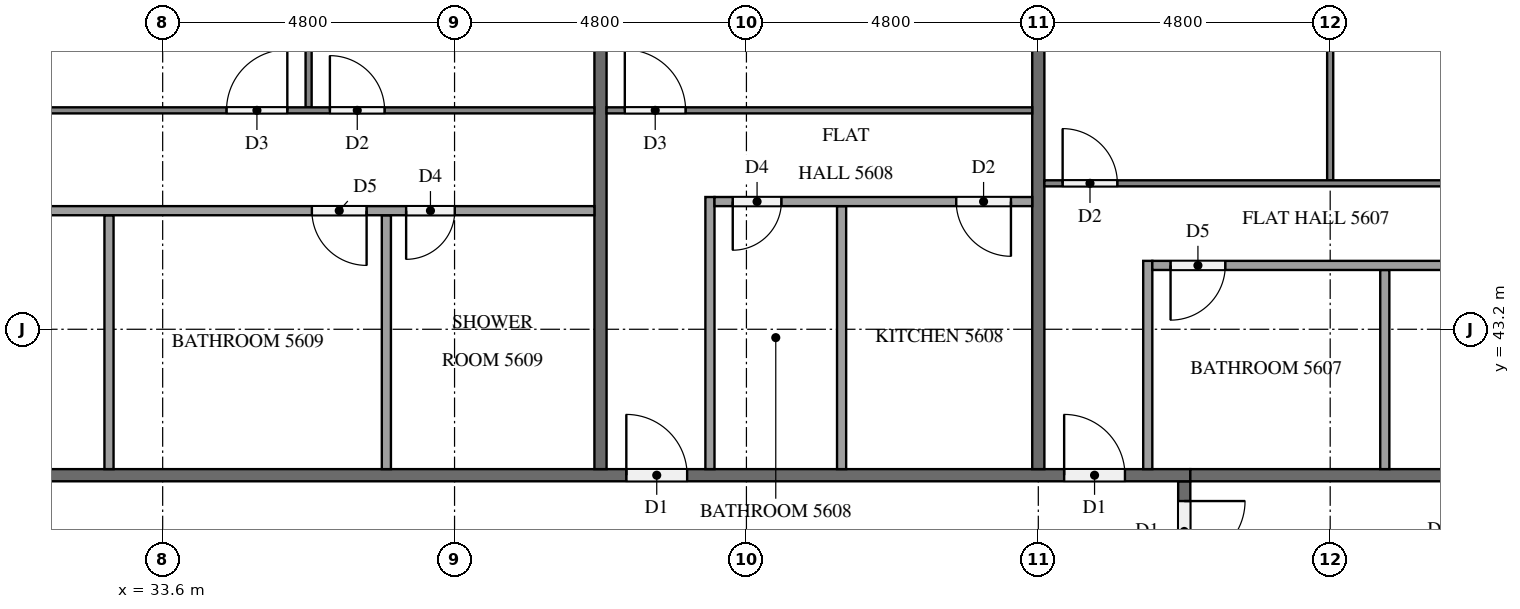
"""IFC4 building model, lengths in metres.
Left out: names, types, materials, properties, quantities, classifications, styles, units other than length and angle.
Written with IfcOpenShell. Run it as: python <this file> out.ifc"""

import sys

from ifc_helpers import new_model, si_unit, direction, frame, frame_2d, origin, place, context, subcontext, project, spatial, rectangle, extrude, element, fill, save


model = new_model("IFC4")
c1 = context("Model", 3, precision=1e-05, world=origin(), true_north=direction((0.0, 1.0)))
c2 = subcontext(c1, "Body", "Model", "MODEL_VIEW")
j1 = project(units=[si_unit("LENGTHUNIT", "METRE"), si_unit("PLANEANGLEUNIT", "RADIAN")], contexts=[c1])
p1 = place(None, origin())
s1 = spatial("IfcSite", under=j1, at=p1, CompositionType="ELEMENT")
p2 = place(p1, origin())
s2 = spatial("IfcBuilding", under=s1, at=p2, CompositionType="ELEMENT")
p3 = place(p2, frame((0.0, 0.0, 215.8)))
s3 = spatial("IfcBuildingStorey", under=s2, at=p3, CompositionType="ELEMENT", Elevation=215.8)
p4 = place(p3, frame((50.4, 40.7, 0.0), z_axis=(0.0, 0.0, 1.0), x_axis=(0.0, -1.0, 0.0)))
e1 = element("IfcWall", 1, at=p4, inside=s3, PredefinedType="PARTITIONING", context=c2, shape_type="SweptSolid", body=[
    extrude(rectangle(XDim=28.6, YDim=0.2, at=frame_2d((14.3, 0.0))), origin(), (0.0, 0.0, 1.0), 3.2),
])
p5 = place(p4, frame((19.525, 0.0, 0.0)))
e2 = element("IfcOpeningElement", 2, at=p5, cuts=e1, PredefinedType="OPENING", context=c2, shape_type="SweptSolid", body=[
    extrude(rectangle(XDim=1.0, YDim=2.1, at=frame_2d((0.5, 1.05))), frame((0.0, 0.11, 0.0), z_axis=(0.0, -1.0, 0.0), x_axis=(1.0, 0.0, 0.0)), (0.0, 0.0, 1.0), 0.22),
])
p6 = place(p4, frame((7.525, 0.0, 0.0)))
e3 = element("IfcOpeningElement", 3, at=p6, cuts=e1, PredefinedType="OPENING", context=c2, shape_type="SweptSolid", body=[
    extrude(rectangle(XDim=1.0, YDim=2.1, at=frame_2d((0.5, 1.05))), frame((0.0, 0.11, 0.0), z_axis=(0.0, -1.0, 0.0), x_axis=(1.0, 0.0, 0.0)), (0.0, 0.0, 1.0), 0.22),
])
p7 = place(p4, frame((0.325, 0.0, 0.0)))
e4 = element("IfcOpeningElement", 4, at=p7, cuts=e1, PredefinedType="OPENING", context=c2, shape_type="SweptSolid", body=[
    extrude(rectangle(XDim=1.0, YDim=2.1, at=frame_2d((0.5, 1.05))), frame((0.0, 0.11, 0.0), z_axis=(0.0, -1.0, 0.0), x_axis=(1.0, 0.0, 0.0)), (0.0, 0.0, 1.0), 0.22),
])
p8 = place(p3, frame((11.9, 40.8, 0.0), z_axis=(0.0, 0.0, 1.0), x_axis=(1.0, 0.0, 0.0)))
e5 = element("IfcWall", 5, at=p8, inside=s3, PredefinedType="PARTITIONING", context=c2, shape_type="SweptSolid", body=[
    extrude(rectangle(XDim=38.6, YDim=0.2, at=frame_2d((19.3, 0.0))), origin(), (0.0, 0.0, 1.0), 3.2),
])
p9 = place(p8, frame((36.525, 0.0, 0.0)))
e6 = element("IfcOpeningElement", 6, at=p9, cuts=e5, PredefinedType="OPENING", context=c2, shape_type="SweptSolid", body=[
    extrude(rectangle(XDim=1.0, YDim=2.1, at=frame_2d((0.5, 1.05))), frame((0.0, 0.11, 0.0), z_axis=(0.0, -1.0, 0.0), x_axis=(1.0, 0.0, 0.0)), (0.0, 0.0, 1.0), 0.22),
])
p10 = place(p8, frame((29.325, 0.0, 0.0)))
e7 = element("IfcOpeningElement", 7, at=p10, cuts=e5, PredefinedType="OPENING", context=c2, shape_type="SweptSolid", body=[
    extrude(rectangle(XDim=1.0, YDim=2.1, at=frame_2d((0.5, 1.05))), frame((0.0, 0.11, 0.0), z_axis=(0.0, -1.0, 0.0), x_axis=(1.0, 0.0, 0.0)), (0.0, 0.0, 1.0), 0.22),
])
p11 = place(p8, frame((12.525, 0.0, 0.0)))
e8 = element("IfcOpeningElement", 8, at=p11, cuts=e5, PredefinedType="OPENING", context=c2, shape_type="SweptSolid", body=[
    extrude(rectangle(XDim=1.0, YDim=2.1, at=frame_2d((0.5, 1.05))), frame((0.0, 0.11, 0.0), z_axis=(0.0, -1.0, 0.0), x_axis=(1.0, 0.0, 0.0)), (0.0, 0.0, 1.0), 0.22),
])
p12 = place(p8, frame((10.625, 0.0, 0.0)))
e9 = element("IfcOpeningElement", 9, at=p12, cuts=e5, PredefinedType="OPENING", context=c2, shape_type="SweptSolid", body=[
    extrude(rectangle(XDim=1.1, YDim=2.1, at=frame_2d((0.55, 1.05))), frame((0.0, 0.11, 0.0), z_axis=(0.0, -1.0, 0.0), x_axis=(1.0, 0.0, 0.0)), (0.0, 0.0, 1.0), 0.22),
])
p13 = place(p3, frame((50.5, 40.8, 0.0), z_axis=(0.0, 0.0, 1.0), x_axis=(1.0, 0.0, 0.0)))
e10 = element("IfcWall", 10, at=p13, inside=s3, PredefinedType="PARTITIONING", context=c2, shape_type="SweptSolid", body=[
    extrude(rectangle(XDim=11.8, YDim=0.2, at=frame_2d((5.9, 0.0))), origin(), (0.0, 0.0, 1.0), 3.2),
])
p14 = place(p3, frame((48.0, 52.475, 0.0), z_axis=(0.0, 0.0, 1.0), x_axis=(0.0, -1.0, 0.0)))
e11 = element("IfcWall", 11, at=p14, inside=s3, PredefinedType="PARTITIONING", context=c2, shape_type="SweptSolid", body=[
    extrude(rectangle(XDim=11.575, YDim=0.2, at=frame_2d((5.788, 0.0))), origin(), (0.0, 0.0, 1.0), 3.2),
])
p15 = place(p3, frame((40.8, 52.7, 0.0), z_axis=(0.0, 0.0, 1.0), x_axis=(0.0, -1.0, 0.0)))
e12 = element("IfcWall", 12, at=p15, inside=s3, PredefinedType="PARTITIONING", context=c2, shape_type="SweptSolid", body=[
    extrude(rectangle(XDim=11.8, YDim=0.2, at=frame_2d((5.9, 0.0))), origin(), (0.0, 0.0, 1.0), 3.2),
])
p16 = place(p3, frame((52.8, 45.65, 0.0), z_axis=(0.0, 0.0, 1.0), x_axis=(0.0, 1.0, 0.0)))
e13 = element("IfcWall", 13, at=p16, inside=s3, PredefinedType="PARTITIONING", context=c2, shape_type="SweptSolid", body=[
    extrude(rectangle(XDim=7.05, YDim=0.1, at=frame_2d((3.525, 0.0))), origin(), (0.0, 0.0, 1.0), 3.2),
])
p17 = place(p3, frame((48.1, 45.6, 0.0), z_axis=(0.0, 0.0, 1.0), x_axis=(1.0, 0.0, 0.0)))
e14 = element("IfcWall", 14, at=p17, inside=s3, PredefinedType="PARTITIONING", context=c2, shape_type="SweptSolid", body=[
    extrude(rectangle(XDim=14.2, YDim=0.1, at=frame_2d((7.1, 0.0))), origin(), (0.0, 0.0, 1.0), 3.2),
])
p18 = place(p17, frame((0.3, 0.0, 0.0)))
e15 = element("IfcOpeningElement", 15, at=p18, cuts=e14, PredefinedType="OPENING", context=c2, shape_type="SweptSolid", body=[
    extrude(rectangle(XDim=0.9, YDim=2.1, at=frame_2d((0.45, 1.05))), frame((0.0, 0.06, 0.0), z_axis=(0.0, -1.0, 0.0), x_axis=(1.0, 0.0, 0.0)), (0.0, 0.0, 1.0), 0.12),
])
p19 = place(p17, frame((8.25, 0.0, 0.0)))
e16 = element("IfcOpeningElement", 16, at=p19, cuts=e14, PredefinedType="OPENING", context=c2, shape_type="SweptSolid", body=[
    extrude(rectangle(XDim=0.9, YDim=2.1, at=frame_2d((0.45, 1.05))), frame((0.0, 0.06, 0.0), z_axis=(0.0, -1.0, 0.0), x_axis=(1.0, 0.0, 0.0)), (0.0, 0.0, 1.0), 0.12),
])
p20 = place(p17, frame((9.85, 0.0, 0.0)))
e17 = element("IfcOpeningElement", 17, at=p20, cuts=e14, PredefinedType="OPENING", context=c2, shape_type="SweptSolid", body=[
    extrude(rectangle(XDim=1.0, YDim=2.1, at=frame_2d((0.5, 1.05))), frame((0.0, 0.06, 0.0), z_axis=(0.0, -1.0, 0.0), x_axis=(1.0, 0.0, 0.0)), (0.0, 0.0, 1.0), 0.12),
])
p21 = place(p3, frame((53.698, 40.9, 0.0), z_axis=(0.0, 0.0, 1.0), x_axis=(0.0, 1.0, 0.0)))
e18 = element("IfcWall", 18, at=p21, inside=s3, PredefinedType="PARTITIONING", context=c2, shape_type="SweptSolid", body=[
    extrude(rectangle(XDim=3.275, YDim=0.15, at=frame_2d((1.638, 0.0))), origin(), (0.0, 0.0, 1.0), 3.2),
])
p22 = place(p3, frame((49.8, 40.9, 0.0), z_axis=(0.0, 0.0, 1.0), x_axis=(0.0, 1.0, 0.0)))
e19 = element("IfcWall", 19, at=p22, inside=s3, PredefinedType="PARTITIONING", context=c2, shape_type="SweptSolid", body=[
    extrude(rectangle(XDim=3.425, YDim=0.15, at=frame_2d((1.712, 0.0))), origin(), (0.0, 0.0, 1.0), 3.2),
])
p23 = place(p3, frame((62.3, 44.25, 0.0), z_axis=(0.0, 0.0, 1.0), x_axis=(-1.0, 0.0, 0.0)))
e20 = element("IfcWall", 20, at=p23, inside=s3, PredefinedType="PARTITIONING", context=c2, shape_type="SweptSolid", body=[
    extrude(rectangle(XDim=12.425, YDim=0.15, at=frame_2d((6.212, 0.0))), origin(), (0.0, 0.0, 1.0), 3.2),
])
p24 = place(p23, frame((11.225, 0.0, 0.0)))
e21 = element("IfcOpeningElement", 21, at=p24, cuts=e20, PredefinedType="OPENING", context=c2, shape_type="SweptSolid", body=[
    extrude(rectangle(XDim=0.9, YDim=2.1, at=frame_2d((0.45, 1.05))), frame((0.0, 0.085, 0.0), z_axis=(0.0, -1.0, 0.0), x_axis=(1.0, 0.0, 0.0)), (0.0, 0.0, 1.0), 0.17),
])
p25 = place(p23, frame((3.192, 0.0, 0.0)))
e22 = element("IfcOpeningElement", 22, at=p25, cuts=e20, PredefinedType="OPENING", context=c2, shape_type="SweptSolid", body=[
    extrude(rectangle(XDim=0.9, YDim=2.1, at=frame_2d((0.45, 1.05))), frame((0.0, 0.085, 0.0), z_axis=(0.0, -1.0, 0.0), x_axis=(1.0, 0.0, 0.0)), (0.0, 0.0, 1.0), 0.17),
])
p26 = place(p23, frame((1.742, 0.0, 0.0)))
e23 = element("IfcOpeningElement", 23, at=p26, cuts=e20, PredefinedType="OPENING", context=c2, shape_type="SweptSolid", body=[
    extrude(rectangle(XDim=0.8, YDim=2.1, at=frame_2d((0.4, 1.05))), frame((0.0, 0.085, 0.0), z_axis=(0.0, -1.0, 0.0), x_axis=(1.0, 0.0, 0.0)), (0.0, 0.0, 1.0), 0.17),
])
p27 = place(p3, frame((40.9, 46.8, 0.0), z_axis=(0.0, 0.0, 1.0), x_axis=(1.0, 0.0, 0.0)))
e24 = element("IfcWall", 24, at=p27, inside=s3, PredefinedType="PARTITIONING", context=c2, shape_type="SweptSolid", body=[
    extrude(rectangle(XDim=7.0, YDim=0.1, at=frame_2d((3.5, 0.0))), origin(), (0.0, 0.0, 1.0), 3.2),
])
p28 = place(p27, frame((0.3, 0.0, 0.0)))
e25 = element("IfcOpeningElement", 25, at=p28, cuts=e24, PredefinedType="OPENING", context=c2, shape_type="SweptSolid", body=[
    extrude(rectangle(XDim=1.0, YDim=2.1, at=frame_2d((0.5, 1.05))), frame((0.0, 0.06, 0.0), z_axis=(0.0, -1.0, 0.0), x_axis=(1.0, 0.0, 0.0)), (0.0, 0.0, 1.0), 0.12),
])
p29 = place(p3, frame((44.765, 40.9, 0.0), z_axis=(0.0, 0.0, 1.0), x_axis=(0.0, 1.0, 0.0)))
e26 = element("IfcWall", 26, at=p29, inside=s3, PredefinedType="PARTITIONING", context=c2, shape_type="SweptSolid", body=[
    extrude(rectangle(XDim=4.325, YDim=0.15, at=frame_2d((2.163, 0.0))), origin(), (0.0, 0.0, 1.0), 3.2),
])
p30 = place(p3, frame((42.6, 40.9, 0.0), z_axis=(0.0, 0.0, 1.0), x_axis=(0.0, 1.0, 0.0)))
e27 = element("IfcWall", 27, at=p30, inside=s3, PredefinedType="PARTITIONING", context=c2, shape_type="SweptSolid", body=[
    extrude(rectangle(XDim=4.475, YDim=0.15, at=frame_2d((2.238, 0.0))), origin(), (0.0, 0.0, 1.0), 3.2),
])
p31 = place(p3, frame((47.9, 45.3, 0.0), z_axis=(0.0, 0.0, 1.0), x_axis=(-1.0, 0.0, 0.0)))
e28 = element("IfcWall", 28, at=p31, inside=s3, PredefinedType="PARTITIONING", context=c2, shape_type="SweptSolid", body=[
    extrude(rectangle(XDim=5.225, YDim=0.15, at=frame_2d((2.612, 0.0))), origin(), (0.0, 0.0, 1.0), 3.2),
])
p32 = place(p31, frame((4.125, 0.0, 0.0)))
e29 = element("IfcOpeningElement", 29, at=p32, cuts=e28, PredefinedType="OPENING", context=c2, shape_type="SweptSolid", body=[
    extrude(rectangle(XDim=0.8, YDim=2.1, at=frame_2d((0.4, 1.05))), frame((0.0, 0.085, 0.0), z_axis=(0.0, -1.0, 0.0), x_axis=(1.0, 0.0, 0.0)), (0.0, 0.0, 1.0), 0.17),
])
p33 = place(p31, frame((0.35, 0.0, 0.0)))
e30 = element("IfcOpeningElement", 30, at=p33, cuts=e28, PredefinedType="OPENING", context=c2, shape_type="SweptSolid", body=[
    extrude(rectangle(XDim=0.9, YDim=2.1, at=frame_2d((0.45, 1.05))), frame((0.0, 0.085, 0.0), z_axis=(0.0, -1.0, 0.0), x_axis=(1.0, 0.0, 0.0)), (0.0, 0.0, 1.0), 0.17),
])
p34 = place(p3, frame((36.0, 46.85, 0.0), z_axis=(0.0, 0.0, 1.0), x_axis=(0.0, 1.0, 0.0)))
e31 = element("IfcWall", 31, at=p34, inside=s3, PredefinedType="PARTITIONING", context=c2, shape_type="SweptSolid", body=[
    extrude(rectangle(XDim=5.85, YDim=0.1, at=frame_2d((2.925, 0.0))), origin(), (0.0, 0.0, 1.0), 3.2),
])
p35 = place(p3, frame((24.1, 46.8, 0.0), z_axis=(0.0, 0.0, 1.0), x_axis=(1.0, 0.0, 0.0)))
e32 = element("IfcWall", 32, at=p35, inside=s3, PredefinedType="PARTITIONING", context=c2, shape_type="SweptSolid", body=[
    extrude(rectangle(XDim=16.6, YDim=0.1, at=frame_2d((8.3, 0.0))), origin(), (0.0, 0.0, 1.0), 3.2),
])
p36 = place(p35, frame((0.3, 0.0, 0.0)))
e33 = element("IfcOpeningElement", 33, at=p36, cuts=e32, PredefinedType="OPENING", context=c2, shape_type="SweptSolid", body=[
    extrude(rectangle(XDim=0.9, YDim=2.1, at=frame_2d((0.45, 1.05))), frame((0.0, 0.06, 0.0), z_axis=(0.0, -1.0, 0.0), x_axis=(1.0, 0.0, 0.0)), (0.0, 0.0, 1.0), 0.12),
])
p37 = place(p35, frame((10.55, 0.0, 0.0)))
e34 = element("IfcOpeningElement", 34, at=p37, cuts=e32, PredefinedType="OPENING", context=c2, shape_type="SweptSolid", body=[
    extrude(rectangle(XDim=1.0, YDim=2.1, at=frame_2d((0.5, 1.05))), frame((0.0, 0.06, 0.0), z_axis=(0.0, -1.0, 0.0), x_axis=(1.0, 0.0, 0.0)), (0.0, 0.0, 1.0), 0.12),
])
p38 = place(p35, frame((12.25, 0.0, 0.0)))
e35 = element("IfcOpeningElement", 35, at=p38, cuts=e32, PredefinedType="OPENING", context=c2, shape_type="SweptSolid", body=[
    extrude(rectangle(XDim=0.9, YDim=2.1, at=frame_2d((0.45, 1.05))), frame((0.0, 0.06, 0.0), z_axis=(0.0, -1.0, 0.0), x_axis=(1.0, 0.0, 0.0)), (0.0, 0.0, 1.0), 0.12),
])
for number, where, z_axis, x_axis in (
    (36, (32.717, 40.9, 0.0), (0.0, 0.0, 1.0), (0.0, 1.0, 0.0)),
    (37, (37.279, 40.9, 0.0), (0.0, 0.0, 1.0), (0.0, 1.0, 0.0)),
):
    element("IfcWall", number, at=place(p3, frame(where, z_axis=z_axis, x_axis=x_axis)), inside=s3, PredefinedType="PARTITIONING", context=c2, shape_type="SweptSolid", body=[
        extrude(rectangle(XDim=4.175, YDim=0.15, at=frame_2d((2.087, 0.0))), origin(), (0.0, 0.0, 1.0), 3.2),
    ])
p39 = place(p3, frame((40.7, 45.15, 0.0), z_axis=(0.0, 0.0, 1.0), x_axis=(-1.0, 0.0, 0.0)))
e38 = element("IfcWall", 38, at=p39, inside=s3, PredefinedType="PARTITIONING", context=c2, shape_type="SweptSolid", body=[
    extrude(rectangle(XDim=14.825, YDim=0.15, at=frame_2d((7.413, 0.0))), origin(), (0.0, 0.0, 1.0), 3.2),
])
p40 = place(p39, frame((13.625, 0.0, 0.0)))
e39 = element("IfcOpeningElement", 39, at=p40, cuts=e38, PredefinedType="OPENING", context=c2, shape_type="SweptSolid", body=[
    extrude(rectangle(XDim=0.9, YDim=2.1, at=frame_2d((0.45, 1.05))), frame((0.0, 0.085, 0.0), z_axis=(0.0, -1.0, 0.0), x_axis=(1.0, 0.0, 0.0)), (0.0, 0.0, 1.0), 0.17),
])
p41 = place(p39, frame((3.746, 0.0, 0.0)))
e40 = element("IfcOpeningElement", 40, at=p41, cuts=e38, PredefinedType="OPENING", context=c2, shape_type="SweptSolid", body=[
    extrude(rectangle(XDim=0.9, YDim=2.1, at=frame_2d((0.45, 1.05))), frame((0.0, 0.085, 0.0), z_axis=(0.0, -1.0, 0.0), x_axis=(1.0, 0.0, 0.0)), (0.0, 0.0, 1.0), 0.17),
])
p42 = place(p39, frame((2.296, 0.0, 0.0)))
e41 = element("IfcOpeningElement", 41, at=p42, cuts=e38, PredefinedType="OPENING", context=c2, shape_type="SweptSolid", body=[
    extrude(rectangle(XDim=0.8, YDim=2.1, at=frame_2d((0.4, 1.05))), frame((0.0, 0.085, 0.0), z_axis=(0.0, -1.0, 0.0), x_axis=(1.0, 0.0, 0.0)), (0.0, 0.0, 1.0), 0.17),
])
p43 = place(p7, origin())
e42 = element("IfcDoor", 42, at=p43, inside=s3, OperationType="SINGLE_SWING_LEFT", PredefinedType="DOOR", context=c2, shape_type="SweptSolid", body=[
    extrude(rectangle(XDim=1.0, YDim=2.1, at=frame_2d((0.5, 1.05))), frame((0.0, 0.025, 0.0), z_axis=(0.0, -1.0, 0.0), x_axis=(1.0, 0.0, 0.0)), (0.0, 0.0, 1.0), 0.05),
])
fill(e4, e42)
p44 = place(p9, origin())
e43 = element("IfcDoor", 43, at=p44, inside=s3, OperationType="SINGLE_SWING_LEFT", PredefinedType="DOOR", context=c2, shape_type="SweptSolid", body=[
    extrude(rectangle(XDim=1.0, YDim=2.1, at=frame_2d((0.5, 1.05))), frame((0.0, 0.025, 0.0), z_axis=(0.0, -1.0, 0.0), x_axis=(1.0, 0.0, 0.0)), (0.0, 0.0, 1.0), 0.05),
])
fill(e6, e43)
p45 = place(p10, origin())
e44 = element("IfcDoor", 44, at=p45, inside=s3, OperationType="SINGLE_SWING_LEFT", PredefinedType="DOOR", context=c2, shape_type="SweptSolid", body=[
    extrude(rectangle(XDim=1.0, YDim=2.1, at=frame_2d((0.5, 1.05))), frame((0.0, 0.025, 0.0), z_axis=(0.0, -1.0, 0.0), x_axis=(1.0, 0.0, 0.0)), (0.0, 0.0, 1.0), 0.05),
])
fill(e7, e44)
p46 = place(p18, origin())
e45 = element("IfcDoor", 45, at=p46, inside=s3, OperationType="SINGLE_SWING_LEFT", PredefinedType="DOOR", context=c2, shape_type="SweptSolid", body=[
    extrude(rectangle(XDim=0.9, YDim=2.1, at=frame_2d((0.45, 1.05))), frame((0.0, 0.025, 0.0), z_axis=(0.0, -1.0, 0.0), x_axis=(1.0, 0.0, 0.0)), (0.0, 0.0, 1.0), 0.05),
])
fill(e15, e45)
p47 = place(p24, origin())
e46 = element("IfcDoor", 46, at=p47, inside=s3, OperationType="SINGLE_SWING_RIGHT", PredefinedType="DOOR", context=c2, shape_type="SweptSolid", body=[
    extrude(rectangle(XDim=0.9, YDim=2.1, at=frame_2d((0.45, 1.05))), frame((0.0, 0.025, 0.0), z_axis=(0.0, -1.0, 0.0), x_axis=(1.0, 0.0, 0.0)), (0.0, 0.0, 1.0), 0.05),
])
fill(e21, e46)
p48 = place(p28, origin())
e47 = element("IfcDoor", 47, at=p48, inside=s3, OperationType="SINGLE_SWING_LEFT", PredefinedType="DOOR", context=c2, shape_type="SweptSolid", body=[
    extrude(rectangle(XDim=1.0, YDim=2.1, at=frame_2d((0.5, 1.05))), frame((0.0, 0.025, 0.0), z_axis=(0.0, -1.0, 0.0), x_axis=(1.0, 0.0, 0.0)), (0.0, 0.0, 1.0), 0.05),
])
fill(e25, e47)
p49 = place(p32, origin())
e48 = element("IfcDoor", 48, at=p49, inside=s3, OperationType="SINGLE_SWING_RIGHT", PredefinedType="DOOR", context=c2, shape_type="SweptSolid", body=[
    extrude(rectangle(XDim=0.8, YDim=2.1, at=frame_2d((0.4, 1.05))), frame((0.0, 0.025, 0.0), z_axis=(0.0, -1.0, 0.0), x_axis=(1.0, 0.0, 0.0)), (0.0, 0.0, 1.0), 0.05),
])
fill(e29, e48)
p50 = place(p33, origin())
e49 = element("IfcDoor", 49, at=p50, inside=s3, OperationType="SINGLE_SWING_LEFT", PredefinedType="DOOR", context=c2, shape_type="SweptSolid", body=[
    extrude(rectangle(XDim=0.9, YDim=2.1, at=frame_2d((0.45, 1.05))), frame((0.0, 0.025, 0.0), z_axis=(0.0, -1.0, 0.0), x_axis=(1.0, 0.0, 0.0)), (0.0, 0.0, 1.0), 0.05),
])
fill(e30, e49)
p51 = place(p37, origin())
e50 = element("IfcDoor", 50, at=p51, inside=s3, OperationType="SINGLE_SWING_RIGHT", PredefinedType="DOOR", context=c2, shape_type="SweptSolid", body=[
    extrude(rectangle(XDim=1.0, YDim=2.1, at=frame_2d((0.5, 1.05))), frame((0.0, 0.025, 0.0), z_axis=(0.0, -1.0, 0.0), x_axis=(1.0, 0.0, 0.0)), (0.0, 0.0, 1.0), 0.05),
])
fill(e34, e50)
p52 = place(p38, origin())
e51 = element("IfcDoor", 51, at=p52, inside=s3, OperationType="SINGLE_SWING_LEFT", PredefinedType="DOOR", context=c2, shape_type="SweptSolid", body=[
    extrude(rectangle(XDim=0.9, YDim=2.1, at=frame_2d((0.45, 1.05))), frame((0.0, 0.025, 0.0), z_axis=(0.0, -1.0, 0.0), x_axis=(1.0, 0.0, 0.0)), (0.0, 0.0, 1.0), 0.05),
])
fill(e35, e51)
p53 = place(p41, origin())
e52 = element("IfcDoor", 52, at=p53, inside=s3, OperationType="SINGLE_SWING_LEFT", PredefinedType="DOOR", context=c2, shape_type="SweptSolid", body=[
    extrude(rectangle(XDim=0.9, YDim=2.1, at=frame_2d((0.45, 1.05))), frame((0.0, 0.025, 0.0), z_axis=(0.0, -1.0, 0.0), x_axis=(1.0, 0.0, 0.0)), (0.0, 0.0, 1.0), 0.05),
])
fill(e40, e52)
p54 = place(p42, origin())
e53 = element("IfcDoor", 53, at=p54, inside=s3, OperationType="SINGLE_SWING_RIGHT", PredefinedType="DOOR", context=c2, shape_type="SweptSolid", body=[
    extrude(rectangle(XDim=0.8, YDim=2.1, at=frame_2d((0.4, 1.05))), frame((0.0, 0.025, 0.0), z_axis=(0.0, -1.0, 0.0), x_axis=(1.0, 0.0, 0.0)), (0.0, 0.0, 1.0), 0.05),
])
fill(e41, e53)
save(model, sys.argv[1])
